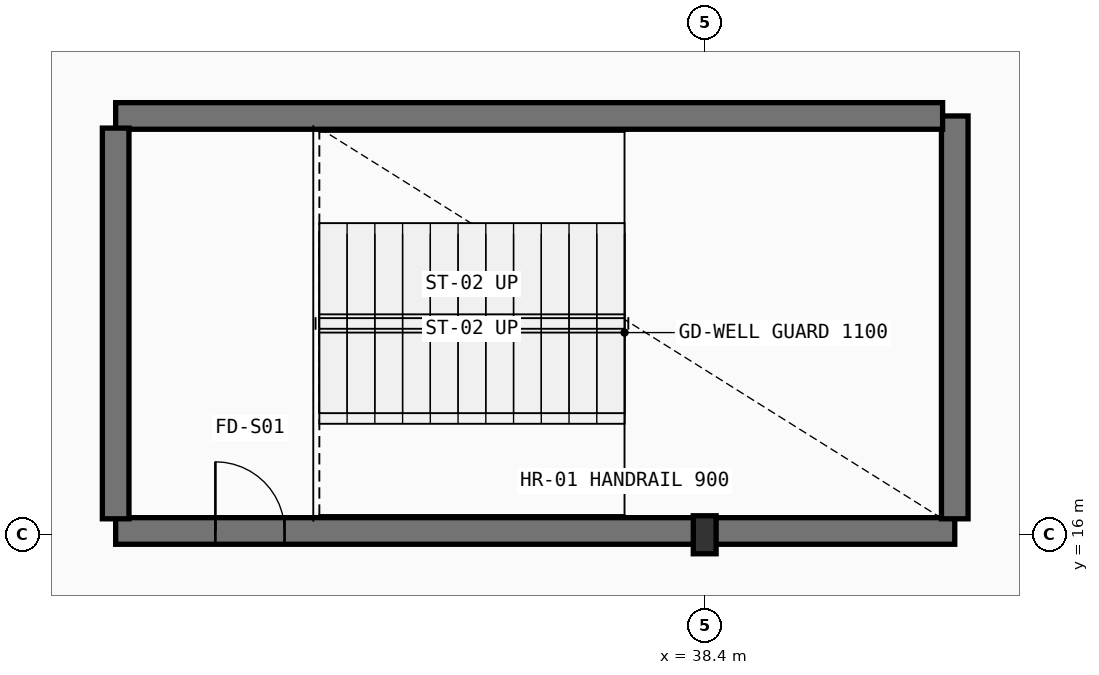
"""IFC4 building model, lengths in metres.
Left out: names, types, materials, properties, quantities, classifications, styles, units other than length and angle.
Written with IfcOpenShell. Run it as: python <this file> out.ifc"""

import sys

from ifc_helpers import new_model, si_unit, direction, frame, frame_2d, origin, origin_2d, place, context, subcontext, project, spatial, rectangle, i_section, extrude, element, fill, save


model = new_model("IFC4")
c1 = context("Model", 3, precision=1e-05, world=origin(), true_north=direction((0.0, 1.0)))
c2 = subcontext(c1, "Body", "Model", "MODEL_VIEW")
j1 = project(units=[si_unit("LENGTHUNIT", "METRE"), si_unit("PLANEANGLEUNIT", "RADIAN")], contexts=[c1])
p1 = place(None, origin())
s1 = spatial("IfcSite", under=j1, at=p1, CompositionType="ELEMENT")
p2 = place(p1, origin())
s2 = spatial("IfcBuilding", under=s1, at=p2, CompositionType="ELEMENT")
p3 = place(p2, frame((0.0, 0.0, 20.4)))
s3 = spatial("IfcBuildingStorey", under=s2, at=p3, CompositionType="ELEMENT", Elevation=20.4)
p4 = place(p3, frame((38.4, 16.0, 0.0), z_axis=(0.0, 0.0, 1.0), x_axis=(1.0, 0.0, 0.0)))
e1 = element("IfcColumn", 1, at=p4, inside=s3, PredefinedType="COLUMN", context=c2, shape_type="SweptSolid", body=[
    extrude(i_section(OverallWidth=0.3, OverallDepth=0.5, WebThickness=0.014, FlangeThickness=0.028, FilletRadius=0.027, at=origin_2d()), origin(), (0.0, 0.0, 1.0), 4.5),
])
p5 = place(p3, frame((30.65, 16.05, 0.0), z_axis=(0.0, 0.0, 1.0), x_axis=(1.0, 0.0, 0.0)))
e2 = element("IfcWall", 2, at=p5, inside=s3, PredefinedType="SHEAR", context=c2, shape_type="SweptSolid", body=[
    extrude(rectangle(XDim=11.04, YDim=0.35, at=frame_2d((5.52, 0.0))), origin(), (0.0, 0.0, 1.0), 4.25),
])
p6 = place(p5, frame((1.312, 0.0, 0.0)))
e3 = element("IfcOpeningElement", 3, at=p6, cuts=e2, PredefinedType="OPENING", context=c2, shape_type="SweptSolid", body=[
    extrude(rectangle(XDim=0.91, YDim=2.08, at=frame_2d((0.455, 1.04))), frame((0.0, 0.185, 0.0), z_axis=(0.0, -1.0, 0.0), x_axis=(1.0, 0.0, 0.0)), (0.0, 0.0, 1.0), 0.37),
])
p7 = place(p3, frame((41.69, 16.21, 0.0), z_axis=(0.0, 0.0, 1.0), x_axis=(0.0, 1.0, 0.0)))
e4 = element("IfcWall", 4, at=p7, inside=s3, PredefinedType="SHEAR", context=c2, shape_type="SweptSolid", body=[
    extrude(rectangle(XDim=5.3, YDim=0.35, at=frame_2d((2.65, 0.0))), origin(), (0.0, 0.0, 1.0), 4.25),
])
p8 = place(p3, frame((41.53, 21.51, 0.0), z_axis=(0.0, 0.0, 1.0), x_axis=(-1.0, 0.0, 0.0)))
e5 = element("IfcWall", 5, at=p8, inside=s3, PredefinedType="SHEAR", context=c2, shape_type="SweptSolid", body=[
    extrude(rectangle(XDim=10.88, YDim=0.35, at=frame_2d((5.44, 0.0))), origin(), (0.0, 0.0, 1.0), 4.25),
])
p9 = place(p3, frame((30.65, 21.35, 0.0), z_axis=(0.0, 0.0, 1.0), x_axis=(0.0, -1.0, 0.0)))
e6 = element("IfcWall", 6, at=p9, inside=s3, PredefinedType="SHEAR", context=c2, shape_type="SweptSolid", body=[
    extrude(rectangle(XDim=5.14, YDim=0.35, at=frame_2d((2.57, 0.0))), origin(), (0.0, 0.0, 1.0), 4.25),
])
p10 = place(p6, origin())
e7 = element("IfcDoor", 7, at=p10, inside=s3, OperationType="SINGLE_SWING_LEFT", PredefinedType="DOOR", context=c2, shape_type="SweptSolid", body=[
    extrude(rectangle(XDim=0.91, YDim=2.08, at=frame_2d((0.455, 1.04))), frame((0.0, 0.025, 0.0), z_axis=(0.0, -1.0, 0.0), x_axis=(1.0, 0.0, 0.0)), (0.0, 0.0, 1.0), 0.05),
])
fill(e3, e7)
save(model, sys.argv[1])
